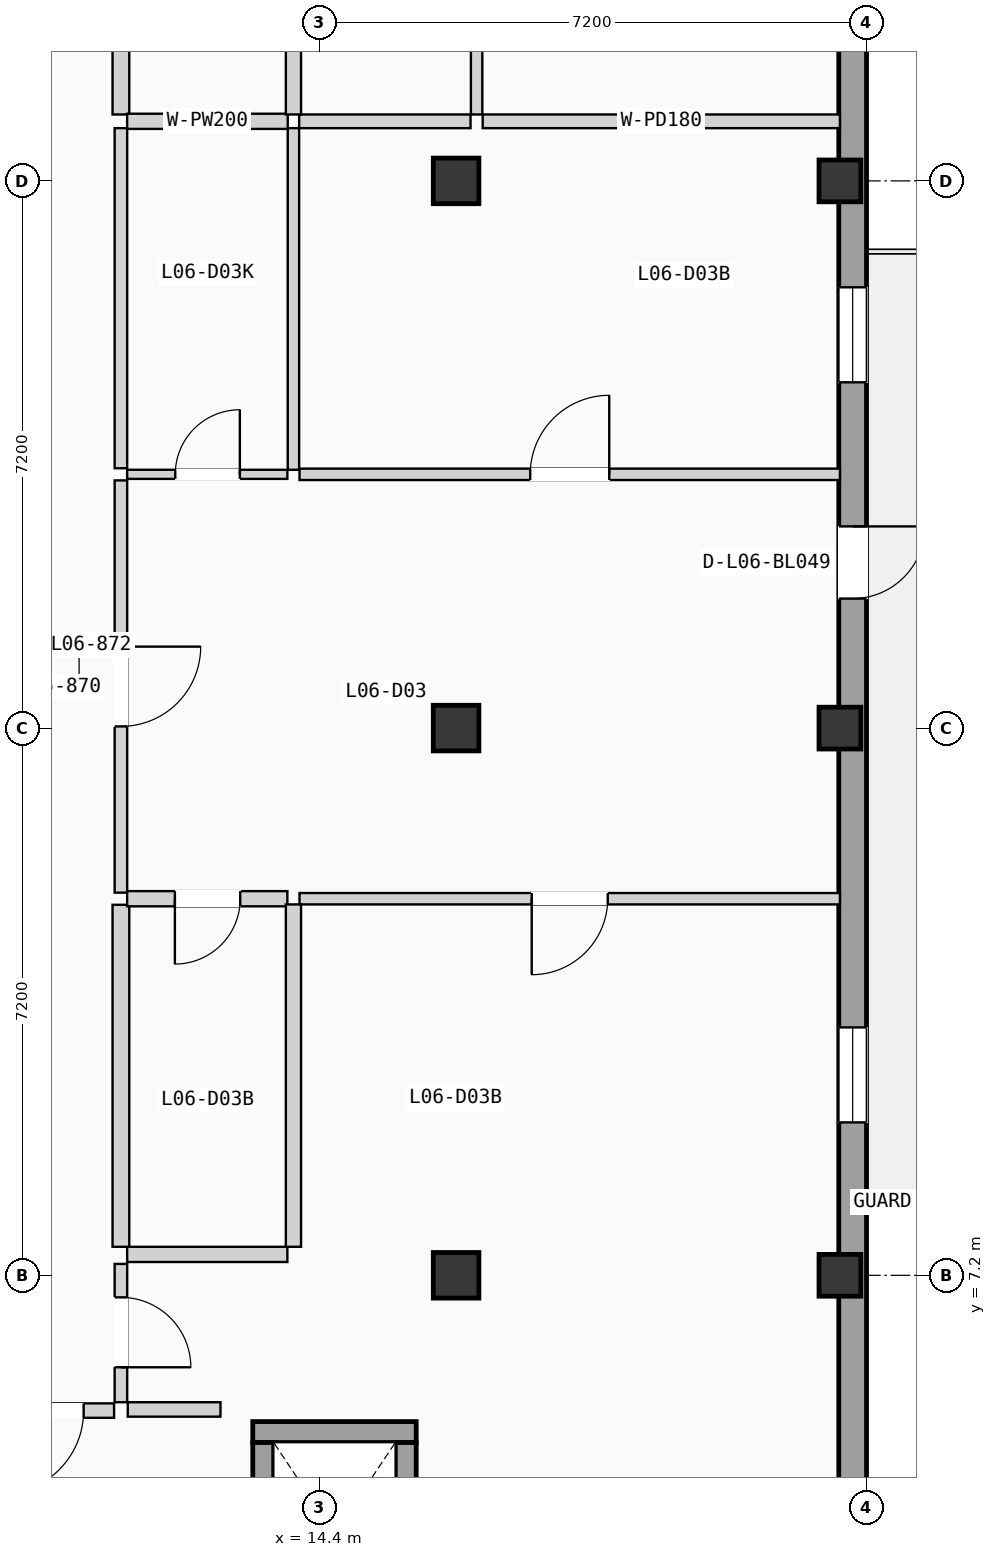
"""IFC4 building model, lengths in metres.
Left out: names, types, materials, properties, quantities, classifications, styles, units other than length and angle.
Written with IfcOpenShell. Run it as: python <this file> out.ifc"""

import sys

from ifc_helpers import new_model, si_unit, direction, frame, frame_2d, origin, origin_2d, place, context, subcontext, project, spatial, rectangle, extrude, element, fill, save


model = new_model("IFC4")
c1 = context("Model", 3, precision=1e-05, world=origin(), true_north=direction((0.0, 1.0)))
c2 = subcontext(c1, "Body", "Model", "MODEL_VIEW")
j1 = project(units=[si_unit("LENGTHUNIT", "METRE"), si_unit("PLANEANGLEUNIT", "RADIAN")], contexts=[c1])
p1 = place(None, origin())
s1 = spatial("IfcSite", under=j1, at=p1, CompositionType="ELEMENT")
p2 = place(p1, origin())
s2 = spatial("IfcBuilding", under=s1, at=p2, CompositionType="ELEMENT")
p3 = place(p2, frame((0.0, 0.0, 21.525)))
s3 = spatial("IfcBuildingStorey", under=s2, at=p3, CompositionType="ELEMENT", Elevation=21.525)
for number, where, z_axis, x_axis in (
    (1, (16.2, 7.2, 0.0), (0.0, 0.0, 1.0), (1.0, 0.0, 0.0)),
    (2, (16.2, 14.4, 0.0), (0.0, 0.0, 1.0), (1.0, 0.0, 0.0)),
    (3, (16.2, 21.6, 0.0), (0.0, 0.0, 1.0), (1.0, 0.0, 0.0)),
):
    element("IfcColumn", number, at=place(p3, frame(where, z_axis=z_axis, x_axis=x_axis)), inside=s3, PredefinedType="COLUMN", context=c2, shape_type="SweptSolid", body=[
        extrude(rectangle(XDim=0.6, YDim=0.6, at=origin_2d()), origin(), (0.0, 0.0, 1.0), 3.15),
    ])
for number, where, z_axis, x_axis in (
    (4, (21.25, 7.2, 0.0), (0.0, 0.0, 1.0), (1.0, 0.0, 0.0)),
    (5, (21.25, 14.4, 0.0), (0.0, 0.0, 1.0), (1.0, 0.0, 0.0)),
    (6, (21.25, 21.6, 0.0), (0.0, 0.0, 1.0), (1.0, 0.0, 0.0)),
):
    element("IfcColumn", number, at=place(p3, frame(where, z_axis=z_axis, x_axis=x_axis)), inside=s3, PredefinedType="COLUMN", context=c2, shape_type="SweptSolid", body=[
        extrude(rectangle(XDim=0.55, YDim=0.55, at=origin_2d()), origin(), (0.0, 0.0, 1.0), 3.15),
    ])
p4 = place(p3, frame((21.417, 0.365, 0.0), z_axis=(0.0, 0.0, 1.0), x_axis=(0.0, 1.0, 0.0)))
e7 = element("IfcWall", 7, at=p4, inside=s3, PredefinedType="SOLIDWALL", context=c2, shape_type="SweptSolid", body=[
    extrude(rectangle(XDim=49.67, YDim=0.365, at=frame_2d((24.835, 0.0))), origin(), (0.0, 0.0, 1.0), 2.89),
])
p5 = place(p4, frame((15.739, 0.0, 0.0)))
e8 = element("IfcOpeningElement", 8, at=p5, cuts=e7, PredefinedType="OPENING", context=c2, shape_type="SweptSolid", body=[
    extrude(rectangle(XDim=0.95, YDim=2.15, at=frame_2d((0.475, 1.075))), frame((0.0, 0.192, 0.0), z_axis=(0.0, -1.0, 0.0), x_axis=(1.0, 0.0, 0.0)), (0.0, 0.0, 1.0), 0.385),
])
p6 = place(p4, frame((8.847, 0.0, 0.9)))
e9 = element("IfcOpeningElement", 9, at=p6, cuts=e7, PredefinedType="OPENING", context=c2, shape_type="SweptSolid", body=[
    extrude(rectangle(XDim=1.25, YDim=1.2, at=frame_2d((0.625, 0.6))), frame((0.0, 0.192, 0.0), z_axis=(0.0, -1.0, 0.0), x_axis=(1.0, 0.0, 0.0)), (0.0, 0.0, 1.0), 0.385),
])
p7 = place(p4, frame((18.585, 0.0, 0.855)))
e10 = element("IfcOpeningElement", 10, at=p7, cuts=e7, PredefinedType="OPENING", context=c2, shape_type="SweptSolid", body=[
    extrude(rectangle(XDim=1.25, YDim=1.35, at=frame_2d((0.625, 0.675))), frame((0.0, 0.192, 0.0), z_axis=(0.0, -1.0, 0.0), x_axis=(1.0, 0.0, 0.0)), (0.0, 0.0, 1.0), 0.385),
])
p8 = place(p4, frame((32.32, 0.0, 0.0)))
e11 = element("IfcOpeningElement", 11, at=p8, cuts=e7, PredefinedType="OPENING", context=c2, shape_type="SweptSolid", body=[
    extrude(rectangle(XDim=1.08, YDim=2.18, at=frame_2d((0.54, 1.09))), frame((0.0, 0.192, 0.0), z_axis=(0.0, -1.0, 0.0), x_axis=(1.0, 0.0, 0.0)), (0.0, 0.0, 1.0), 0.385),
])
p9 = place(p4, frame((24.512, 0.0, 0.705)))
e12 = element("IfcOpeningElement", 12, at=p9, cuts=e7, PredefinedType="OPENING", context=c2, shape_type="SweptSolid", body=[
    extrude(rectangle(XDim=1.25, YDim=1.5, at=frame_2d((0.625, 0.75))), frame((0.0, 0.192, 0.0), z_axis=(0.0, -1.0, 0.0), x_axis=(1.0, 0.0, 0.0)), (0.0, 0.0, 1.0), 0.385),
])
p10 = place(p4, frame((38.545, 0.0, 0.555)))
e13 = element("IfcOpeningElement", 13, at=p10, cuts=e7, PredefinedType="OPENING", context=c2, shape_type="SweptSolid", body=[
    extrude(rectangle(XDim=1.25, YDim=1.65, at=frame_2d((0.625, 0.825))), frame((0.0, 0.192, 0.0), z_axis=(0.0, -1.0, 0.0), x_axis=(1.0, 0.0, 0.0)), (0.0, 0.0, 1.0), 0.385),
])
p11 = place(p3, frame((13.525, 5.137, 0.0), z_axis=(0.0, 0.0, 1.0), x_axis=(1.0, 0.0, 0.0)))
e14 = element("IfcWall", 14, at=p11, inside=s3, PredefinedType="SHEAR", context=c2, shape_type="SweptSolid", body=[
    extrude(rectangle(XDim=2.15, YDim=0.275, at=frame_2d((1.075, 0.0))), origin(), (0.0, 0.0, 1.0), 2.89),
])
p12 = place(p3, frame((13.663, 2.6, 0.0), z_axis=(0.0, 0.0, 1.0), x_axis=(0.0, 1.0, 0.0)))
e15 = element("IfcWall", 15, at=p12, inside=s3, PredefinedType="SHEAR", context=c2, shape_type="SweptSolid", body=[
    extrude(rectangle(XDim=2.4, YDim=0.275, at=frame_2d((1.2, 0.0))), origin(), (0.0, 0.0, 1.0), 2.89),
])
p13 = place(p12, frame((0.65, 0.0, 0.0)))
e16 = element("IfcOpeningElement", 16, at=p13, cuts=e15, PredefinedType="OPENING", context=c2, shape_type="SweptSolid", body=[
    extrude(rectangle(XDim=1.1, YDim=2.15, at=frame_2d((0.55, 1.075))), frame((0.0, 0.147, 0.0), z_axis=(0.0, -1.0, 0.0), x_axis=(1.0, 0.0, 0.0)), (0.0, 0.0, 1.0), 0.295),
])
p14 = place(p3, frame((15.538, 2.6, 0.0), z_axis=(0.0, 0.0, 1.0), x_axis=(0.0, 1.0, 0.0)))
e17 = element("IfcWall", 17, at=p14, inside=s3, PredefinedType="SHEAR", context=c2, shape_type="SweptSolid", body=[
    extrude(rectangle(XDim=2.4, YDim=0.275, at=frame_2d((1.2, 0.0))), origin(), (0.0, 0.0, 1.0), 2.89),
])
p15 = place(p3, frame((11.88, 5.435, 0.0), z_axis=(0.0, 0.0, 1.0), x_axis=(1.0, 0.0, 0.0)))
e18 = element("IfcWall", 18, at=p15, inside=s3, PredefinedType="PARTITIONING", context=c2, shape_type="SweptSolid", body=[
    extrude(rectangle(XDim=1.22, YDim=0.19, at=frame_2d((0.61, 0.0))), origin(), (0.0, 0.0, 1.0), 2.87),
])
p16 = place(p3, frame((9.7, 5.42, 0.0), z_axis=(0.0, 0.0, 1.0), x_axis=(1.0, 0.0, 0.0)))
e19 = element("IfcWall", 19, at=p16, inside=s3, PredefinedType="PARTITIONING", context=c2, shape_type="SweptSolid", body=[
    extrude(rectangle(XDim=2.0, YDim=0.19, at=frame_2d((1.0, 0.0))), origin(), (0.0, 0.0, 1.0), 2.87),
])
p17 = place(p16, frame((0.5, 0.0, 0.0)))
e20 = element("IfcOpeningElement", 20, at=p17, cuts=e19, PredefinedType="OPENING", context=c2, shape_type="SweptSolid", body=[
    extrude(rectangle(XDim=1.1, YDim=2.12, at=frame_2d((0.55, 1.06))), frame((0.0, 0.105, 0.0), z_axis=(0.0, -1.0, 0.0), x_axis=(1.0, 0.0, 0.0)), (0.0, 0.0, 1.0), 0.21),
])
p18 = place(p3, frame((11.79, 5.53, 0.0), z_axis=(0.0, 0.0, 1.0), x_axis=(0.0, 1.0, 0.0)))
e21 = element("IfcWall", 21, at=p18, inside=s3, PredefinedType="PARTITIONING", context=c2, shape_type="SweptSolid", body=[
    extrude(rectangle(XDim=1.82, YDim=0.165, at=frame_2d((0.91, 0.0))), origin(), (0.0, 0.0, 1.0), 2.87),
])
p19 = place(p18, frame((0.46, 0.0, 0.0)))
e22 = element("IfcOpeningElement", 22, at=p19, cuts=e21, PredefinedType="OPENING", context=c2, shape_type="SweptSolid", body=[
    extrude(rectangle(XDim=0.92, YDim=2.04, at=frame_2d((0.46, 1.02))), frame((0.0, 0.093, 0.0), z_axis=(0.0, -1.0, 0.0), x_axis=(1.0, 0.0, 0.0)), (0.0, 0.0, 1.0), 0.185),
])
p20 = place(p3, frame((11.872, 7.475, 0.0), z_axis=(0.0, 0.0, 1.0), x_axis=(1.0, 0.0, 0.0)))
e23 = element("IfcWall", 23, at=p20, inside=s3, PredefinedType="PLUMBINGWALL", context=c2, shape_type="SweptSolid", body=[
    extrude(rectangle(XDim=2.108, YDim=0.2, at=frame_2d((1.054, 0.0))), origin(), (0.0, 0.0, 1.0), 2.87),
])
p21 = place(p3, frame((11.79, 12.235, 0.0), z_axis=(0.0, 0.0, 1.0), x_axis=(0.0, 1.0, 0.0)))
e24 = element("IfcWall", 24, at=p21, inside=s3, PredefinedType="PARTITIONING", context=c2, shape_type="SweptSolid", body=[
    extrude(rectangle(XDim=5.424, YDim=0.165, at=frame_2d((2.712, 0.0))), origin(), (0.0, 0.0, 1.0), 2.87),
])
p22 = place(p21, frame((2.187, 0.0, 0.0)))
e25 = element("IfcOpeningElement", 25, at=p22, cuts=e24, PredefinedType="OPENING", context=c2, shape_type="SweptSolid", body=[
    extrude(rectangle(XDim=1.05, YDim=2.13, at=frame_2d((0.525, 1.065))), frame((0.0, 0.093, 0.0), z_axis=(0.0, -1.0, 0.0), x_axis=(1.0, 0.0, 0.0)), (0.0, 0.0, 1.0), 0.185),
])
p23 = place(p3, frame((11.79, 7.575, 0.0), z_axis=(0.0, 0.0, 1.0), x_axis=(0.0, 1.0, 0.0)))
e26 = element("IfcWall", 26, at=p23, inside=s3, PredefinedType="PLUMBINGWALL", context=c2, shape_type="SweptSolid", body=[
    extrude(rectangle(XDim=4.5, YDim=0.22, at=frame_2d((2.25, 0.0))), origin(), (0.0, 0.0, 1.0), 2.87),
])
p24 = place(p3, frame((11.79, 17.819, 0.0), z_axis=(0.0, 0.0, 1.0), x_axis=(0.0, 1.0, 0.0)))
e27 = element("IfcWall", 27, at=p24, inside=s3, PredefinedType="PARTITIONING", context=c2, shape_type="SweptSolid", body=[
    extrude(rectangle(XDim=4.475, YDim=0.165, at=frame_2d((2.237, 0.0))), origin(), (0.0, 0.0, 1.0), 2.87),
])
p25 = place(p3, frame((11.79, 22.474, 0.0), z_axis=(0.0, 0.0, 1.0), x_axis=(0.0, 1.0, 0.0)))
e28 = element("IfcWall", 28, at=p25, inside=s3, PredefinedType="PLUMBINGWALL", context=c2, shape_type="SweptSolid", body=[
    extrude(rectangle(XDim=7.196, YDim=0.22, at=frame_2d((3.598, 0.0))), origin(), (0.0, 0.0, 1.0), 2.87),
])
p26 = place(p3, frame((11.872, 12.155, 0.0), z_axis=(0.0, 0.0, 1.0), x_axis=(1.0, 0.0, 0.0)))
e29 = element("IfcWall", 29, at=p26, inside=s3, PredefinedType="PLUMBINGWALL", context=c2, shape_type="SweptSolid", body=[
    extrude(rectangle(XDim=2.108, YDim=0.2, at=frame_2d((1.054, 0.0))), origin(), (0.0, 0.0, 1.0), 2.87),
])
p27 = place(p26, frame((0.628, 0.0, 0.0)))
e30 = element("IfcOpeningElement", 30, at=p27, cuts=e29, PredefinedType="OPENING", context=c2, shape_type="SweptSolid", body=[
    extrude(rectangle(XDim=0.86, YDim=2.0, at=frame_2d((0.43, 1.0))), frame((0.0, 0.11, 0.0), z_axis=(0.0, -1.0, 0.0), x_axis=(1.0, 0.0, 0.0)), (0.0, 0.0, 1.0), 0.22),
])
p28 = place(p3, frame((11.872, 17.739, 0.0), z_axis=(0.0, 0.0, 1.0), x_axis=(1.0, 0.0, 0.0)))
e31 = element("IfcWall", 31, at=p28, inside=s3, PredefinedType="PARTITIONING", context=c2, shape_type="SweptSolid", body=[
    extrude(rectangle(XDim=2.108, YDim=0.12, at=frame_2d((1.054, 0.0))), origin(), (0.0, 0.0, 1.0), 2.87),
])
p29 = place(p28, frame((0.633, 0.0, 0.0)))
e32 = element("IfcOpeningElement", 32, at=p29, cuts=e31, PredefinedType="OPENING", context=c2, shape_type="SweptSolid", body=[
    extrude(rectangle(XDim=0.85, YDim=2.01, at=frame_2d((0.425, 1.005))), frame((0.0, 0.07, 0.0), z_axis=(0.0, -1.0, 0.0), x_axis=(1.0, 0.0, 0.0)), (0.0, 0.0, 1.0), 0.14),
])
p30 = place(p3, frame((14.14, 12.155, 0.0), z_axis=(0.0, 0.0, 1.0), x_axis=(1.0, 0.0, 0.0)))
e33 = element("IfcWall", 33, at=p30, inside=s3, PredefinedType="PARTITIONING", context=c2, shape_type="SweptSolid", body=[
    extrude(rectangle(XDim=7.11, YDim=0.15, at=frame_2d((3.555, 0.0))), origin(), (0.0, 0.0, 1.0), 2.87),
])
p31 = place(p30, frame((3.055, 0.0, 0.0)))
e34 = element("IfcOpeningElement", 34, at=p31, cuts=e33, PredefinedType="OPENING", context=c2, shape_type="SweptSolid", body=[
    extrude(rectangle(XDim=1.0, YDim=2.06, at=frame_2d((0.5, 1.03))), frame((0.0, 0.085, 0.0), z_axis=(0.0, -1.0, 0.0), x_axis=(1.0, 0.0, 0.0)), (0.0, 0.0, 1.0), 0.17),
])
p32 = place(p3, frame((14.14, 17.739, 0.0), z_axis=(0.0, 0.0, 1.0), x_axis=(1.0, 0.0, 0.0)))
e35 = element("IfcWall", 35, at=p32, inside=s3, PredefinedType="PARTITIONING", context=c2, shape_type="SweptSolid", body=[
    extrude(rectangle(XDim=7.11, YDim=0.15, at=frame_2d((3.555, 0.0))), origin(), (0.0, 0.0, 1.0), 2.87),
])
p33 = place(p32, frame((3.035, 0.0, 0.0)))
e36 = element("IfcOpeningElement", 36, at=p33, cuts=e35, PredefinedType="OPENING", context=c2, shape_type="SweptSolid", body=[
    extrude(rectangle(XDim=1.04, YDim=2.08, at=frame_2d((0.52, 1.04))), frame((0.0, 0.085, 0.0), z_axis=(0.0, -1.0, 0.0), x_axis=(1.0, 0.0, 0.0)), (0.0, 0.0, 1.0), 0.17),
])
p34 = place(p3, frame((14.06, 7.575, 0.0), z_axis=(0.0, 0.0, 1.0), x_axis=(0.0, 1.0, 0.0)))
e37 = element("IfcWall", 37, at=p34, inside=s3, PredefinedType="PLUMBINGWALL", context=c2, shape_type="SweptSolid", body=[
    extrude(rectangle(XDim=4.505, YDim=0.2, at=frame_2d((2.252, 0.0))), origin(), (0.0, 0.0, 1.0), 2.87),
])
p35 = place(p3, frame((14.06, 17.799, 0.0), z_axis=(0.0, 0.0, 1.0), x_axis=(0.0, 1.0, 0.0)))
e38 = element("IfcWall", 38, at=p35, inside=s3, PredefinedType="PARTITIONING", context=c2, shape_type="SweptSolid", body=[
    extrude(rectangle(XDim=4.495, YDim=0.15, at=frame_2d((2.248, 0.0))), origin(), (0.0, 0.0, 1.0), 2.87),
])
p36 = place(p3, frame((11.872, 22.384, 0.0), z_axis=(0.0, 0.0, 1.0), x_axis=(1.0, 0.0, 0.0)))
e39 = element("IfcWall", 39, at=p36, inside=s3, PredefinedType="PLUMBINGWALL", context=c2, shape_type="SweptSolid", body=[
    extrude(rectangle(XDim=2.113, YDim=0.2, at=frame_2d((1.057, 0.0))), origin(), (0.0, 0.0, 1.0), 2.87),
])
p37 = place(p3, frame((16.55, 22.384, 0.0), z_axis=(0.0, 0.0, 1.0), x_axis=(1.0, 0.0, 0.0)))
e40 = element("IfcWall", 40, at=p37, inside=s3, PredefinedType="PARTITIONING", context=c2, shape_type="SweptSolid", body=[
    extrude(rectangle(XDim=4.7, YDim=0.18, at=frame_2d((2.35, 0.0))), origin(), (0.0, 0.0, 1.0), 2.87),
])
p38 = place(p3, frame((14.135, 22.384, 0.0), z_axis=(0.0, 0.0, 1.0), x_axis=(1.0, 0.0, 0.0)))
e41 = element("IfcWall", 41, at=p38, inside=s3, PredefinedType="PARTITIONING", context=c2, shape_type="SweptSolid", body=[
    extrude(rectangle(XDim=2.255, YDim=0.18, at=frame_2d((1.127, 0.0))), origin(), (0.0, 0.0, 1.0), 2.87),
])
p39 = place(p3, frame((14.06, 22.474, 0.0), z_axis=(0.0, 0.0, 1.0), x_axis=(0.0, 1.0, 0.0)))
e42 = element("IfcWall", 42, at=p39, inside=s3, PredefinedType="PLUMBINGWALL", context=c2, shape_type="SweptSolid", body=[
    extrude(rectangle(XDim=7.216, YDim=0.2, at=frame_2d((3.608, 0.0))), origin(), (0.0, 0.0, 1.0), 2.87),
])
p40 = place(p39, frame((3.173, 0.0, 0.0)))
e43 = element("IfcOpeningElement", 43, at=p40, cuts=e42, PredefinedType="OPENING", context=c2, shape_type="SweptSolid", body=[
    extrude(rectangle(XDim=0.85, YDim=2.01, at=frame_2d((0.425, 1.005))), frame((0.0, 0.11, 0.0), z_axis=(0.0, -1.0, 0.0), x_axis=(1.0, 0.0, 0.0)), (0.0, 0.0, 1.0), 0.22),
])
p41 = place(p3, frame((16.47, 22.474, 0.0), z_axis=(0.0, 0.0, 1.0), x_axis=(0.0, 1.0, 0.0)))
e44 = element("IfcWall", 44, at=p41, inside=s3, PredefinedType="PARTITIONING", context=c2, shape_type="SweptSolid", body=[
    extrude(rectangle(XDim=7.216, YDim=0.15, at=frame_2d((3.608, 0.0))), origin(), (0.0, 0.0, 1.0), 2.87),
])
p42 = place(p5, frame((0.95, 0.0, 0.0), z_axis=(0.0, 0.0, 1.0), x_axis=(-1.0, 0.0, 0.0)))
e45 = element("IfcDoor", 45, at=p42, inside=s3, OperationType="SINGLE_SWING_RIGHT", PredefinedType="DOOR", context=c2, shape_type="SweptSolid", body=[
    extrude(rectangle(XDim=0.95, YDim=2.15, at=frame_2d((0.475, 1.075))), frame((0.0, 0.025, 0.0), z_axis=(0.0, -1.0, 0.0), x_axis=(1.0, 0.0, 0.0)), (0.0, 0.0, 1.0), 0.05),
])
fill(e8, e45)
p43 = place(p6, origin())
e46 = element("IfcWindow", 46, at=p43, inside=s3, PartitioningType="SINGLE_PANEL", PredefinedType="WINDOW", context=c2, shape_type="SweptSolid", body=[
    extrude(rectangle(XDim=1.25, YDim=1.2, at=frame_2d((0.625, 0.6))), frame((0.0, 0.03, 0.0), z_axis=(0.0, -1.0, 0.0), x_axis=(1.0, 0.0, 0.0)), (0.0, 0.0, 1.0), 0.06),
])
fill(e9, e46)
p44 = place(p7, origin())
e47 = element("IfcWindow", 47, at=p44, inside=s3, PartitioningType="SINGLE_PANEL", PredefinedType="WINDOW", context=c2, shape_type="SweptSolid", body=[
    extrude(rectangle(XDim=1.25, YDim=1.35, at=frame_2d((0.625, 0.675))), frame((0.0, 0.03, 0.0), z_axis=(0.0, -1.0, 0.0), x_axis=(1.0, 0.0, 0.0)), (0.0, 0.0, 1.0), 0.06),
])
fill(e10, e47)
p45 = place(p17, frame((1.1, 0.0, 0.0), z_axis=(0.0, 0.0, 1.0), x_axis=(-1.0, 0.0, 0.0)))
e48 = element("IfcDoor", 48, at=p45, inside=s3, OperationType="SINGLE_SWING_LEFT", PredefinedType="DOOR", context=c2, shape_type="SweptSolid", body=[
    extrude(rectangle(XDim=1.1, YDim=2.12, at=frame_2d((0.55, 1.06))), frame((0.0, 0.025, 0.0), z_axis=(0.0, -1.0, 0.0), x_axis=(1.0, 0.0, 0.0)), (0.0, 0.0, 1.0), 0.05),
])
fill(e20, e48)
p46 = place(p19, frame((0.92, 0.0, 0.0), z_axis=(0.0, 0.0, 1.0), x_axis=(-1.0, 0.0, 0.0)))
e49 = element("IfcDoor", 49, at=p46, inside=s3, OperationType="SINGLE_SWING_LEFT", PredefinedType="DOOR", context=c2, shape_type="SweptSolid", body=[
    extrude(rectangle(XDim=0.92, YDim=2.04, at=frame_2d((0.46, 1.02))), frame((0.0, 0.025, 0.0), z_axis=(0.0, -1.0, 0.0), x_axis=(1.0, 0.0, 0.0)), (0.0, 0.0, 1.0), 0.05),
])
fill(e22, e49)
p47 = place(p22, frame((1.05, 0.0, 0.0), z_axis=(0.0, 0.0, 1.0), x_axis=(-1.0, 0.0, 0.0)))
e50 = element("IfcDoor", 50, at=p47, inside=s3, OperationType="SINGLE_SWING_RIGHT", PredefinedType="DOOR", context=c2, shape_type="SweptSolid", body=[
    extrude(rectangle(XDim=1.05, YDim=2.13, at=frame_2d((0.525, 1.065))), frame((0.0, 0.025, 0.0), z_axis=(0.0, -1.0, 0.0), x_axis=(1.0, 0.0, 0.0)), (0.0, 0.0, 1.0), 0.05),
])
fill(e25, e50)
p48 = place(p27, frame((0.86, 0.0, 0.0), z_axis=(0.0, 0.0, 1.0), x_axis=(-1.0, 0.0, 0.0)))
e51 = element("IfcDoor", 51, at=p48, inside=s3, OperationType="SINGLE_SWING_LEFT", PredefinedType="DOOR", context=c2, shape_type="SweptSolid", body=[
    extrude(rectangle(XDim=0.86, YDim=2.0, at=frame_2d((0.43, 1.0))), frame((0.0, 0.025, 0.0), z_axis=(0.0, -1.0, 0.0), x_axis=(1.0, 0.0, 0.0)), (0.0, 0.0, 1.0), 0.05),
])
fill(e30, e51)
p49 = place(p29, origin())
e52 = element("IfcDoor", 52, at=p49, inside=s3, OperationType="SINGLE_SWING_RIGHT", PredefinedType="DOOR", context=c2, shape_type="SweptSolid", body=[
    extrude(rectangle(XDim=0.85, YDim=2.01, at=frame_2d((0.425, 1.005))), frame((0.0, 0.025, 0.0), z_axis=(0.0, -1.0, 0.0), x_axis=(1.0, 0.0, 0.0)), (0.0, 0.0, 1.0), 0.05),
])
fill(e32, e52)
p50 = place(p31, frame((1.0, 0.0, 0.0), z_axis=(0.0, 0.0, 1.0), x_axis=(-1.0, 0.0, 0.0)))
e53 = element("IfcDoor", 53, at=p50, inside=s3, OperationType="SINGLE_SWING_LEFT", PredefinedType="DOOR", context=c2, shape_type="SweptSolid", body=[
    extrude(rectangle(XDim=1.0, YDim=2.06, at=frame_2d((0.5, 1.03))), frame((0.0, 0.025, 0.0), z_axis=(0.0, -1.0, 0.0), x_axis=(1.0, 0.0, 0.0)), (0.0, 0.0, 1.0), 0.05),
])
fill(e34, e53)
p51 = place(p33, origin())
e54 = element("IfcDoor", 54, at=p51, inside=s3, OperationType="SINGLE_SWING_RIGHT", PredefinedType="DOOR", context=c2, shape_type="SweptSolid", body=[
    extrude(rectangle(XDim=1.04, YDim=2.08, at=frame_2d((0.52, 1.04))), frame((0.0, 0.025, 0.0), z_axis=(0.0, -1.0, 0.0), x_axis=(1.0, 0.0, 0.0)), (0.0, 0.0, 1.0), 0.05),
])
fill(e36, e54)
save(model, sys.argv[1])
